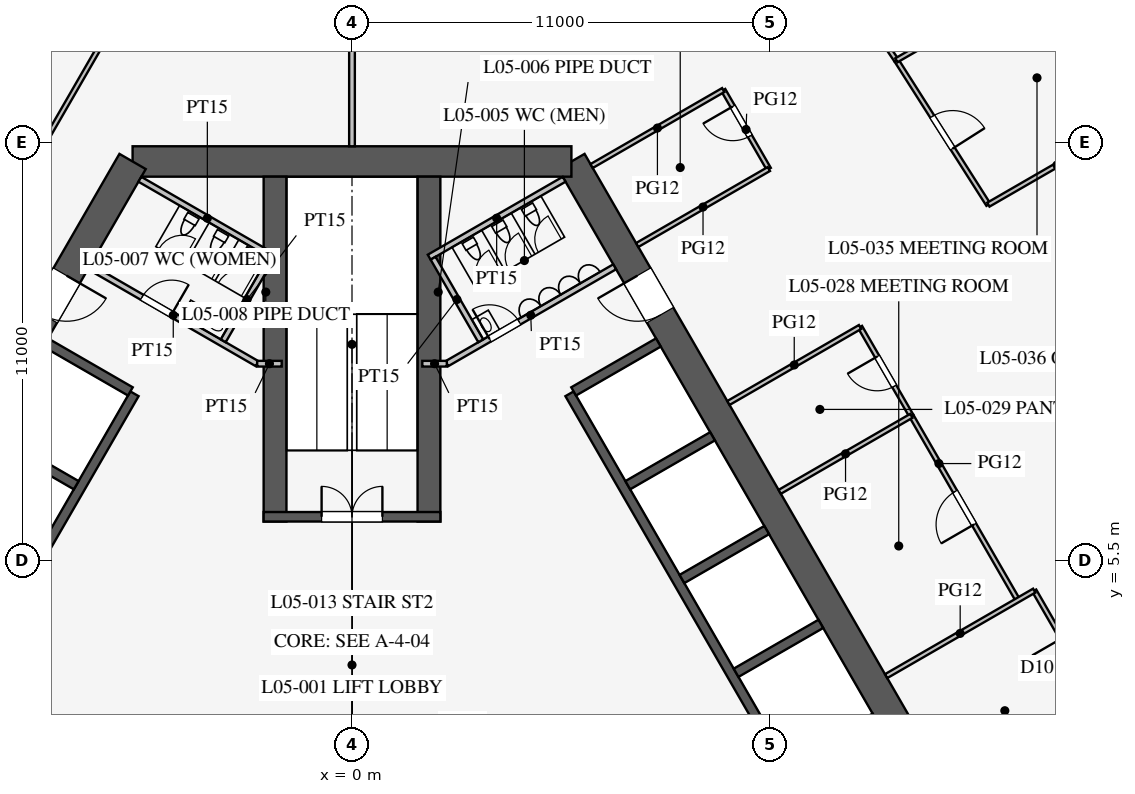
"""IFC4 building model, lengths in metres.
Left out: names, types, materials, properties, quantities, classifications, styles, units other than length and angle.
Written with IfcOpenShell. Run it as: python <this file> out.ifc"""

import sys

from ifc_helpers import new_model, si_unit, direction, frame, frame_2d, origin, place, context, subcontext, project, spatial, rectangle, extrude, element, fill, save


model = new_model("IFC4")
c1 = context("Model", 3, precision=1e-05, world=origin(), true_north=direction((0.0, 1.0)))
c2 = subcontext(c1, "Body", "Model", "MODEL_VIEW")
j1 = project(units=[si_unit("LENGTHUNIT", "METRE"), si_unit("PLANEANGLEUNIT", "RADIAN")], contexts=[c1])
p1 = place(None, origin())
s1 = spatial("IfcSite", under=j1, at=p1, CompositionType="ELEMENT")
p2 = place(p1, origin())
s2 = spatial("IfcBuilding", under=s1, at=p2, CompositionType="ELEMENT")
p3 = place(p2, frame((0.0, 0.0, 24.9)))
s3 = spatial("IfcBuildingStorey", under=s2, at=p3, CompositionType="ELEMENT", Elevation=24.9)
p4 = place(p3, frame((16.743, -3.0, 0.0), z_axis=(0.0, 0.0, 1.0), x_axis=(-0.500002442456, 0.866023993627, 0.0)))
e1 = element("IfcWall", 1, at=p4, inside=s3, PredefinedType="SHEAR", context=c2, shape_type="SweptSolid", body=[
    extrude(rectangle(XDim=21.939, YDim=0.8, at=frame_2d((10.97, 0.0))), origin(), (0.0, 0.0, 1.0), 4.2),
])
p5 = place(p4, frame((17.27, 0.0, 0.0)))
e2 = element("IfcOpeningElement", 2, at=p5, cuts=e1, PredefinedType="OPENING", context=c2, shape_type="SweptSolid", body=[
    extrude(rectangle(XDim=1.2, YDim=2.1, at=frame_2d((0.6, 1.05))), frame((0.0, 0.41, 0.0), z_axis=(0.0, -1.0, 0.0), x_axis=(1.0, 0.0, 0.0)), (0.0, 0.0, 1.0), 0.82),
])
p6 = place(p4, frame((3.47, 0.0, 0.0)))
e3 = element("IfcOpeningElement", 3, at=p6, cuts=e1, PredefinedType="OPENING", context=c2, shape_type="SweptSolid", body=[
    extrude(rectangle(XDim=1.2, YDim=2.1, at=frame_2d((0.6, 1.05))), frame((0.0, 0.41, 0.0), z_axis=(0.0, -1.0, 0.0), x_axis=(1.0, 0.0, 0.0)), (0.0, 0.0, 1.0), 0.82),
])
p7 = place(p3, frame((5.773, 16.0, 0.0), z_axis=(0.0, 0.0, 1.0), x_axis=(-1.0, 0.0, 0.0)))
e4 = element("IfcWall", 4, at=p7, inside=s3, PredefinedType="SHEAR", context=c2, shape_type="SweptSolid", body=[
    extrude(rectangle(XDim=11.547, YDim=0.8, at=frame_2d((5.773, 0.0))), origin(), (0.0, 0.0, 1.0), 4.2),
])
p8 = place(p3, frame((-5.773, 16.0, 0.0), z_axis=(0.0, 0.0, 1.0), x_axis=(-0.500002442456, -0.866023993627, 0.0)))
e5 = element("IfcWall", 5, at=p8, inside=s3, PredefinedType="SHEAR", context=c2, shape_type="SweptSolid", body=[
    extrude(rectangle(XDim=21.939, YDim=0.8, at=frame_2d((10.97, 0.0))), origin(), (0.0, 0.0, 1.0), 4.2),
])
p9 = place(p8, frame((17.27, 0.0, 0.0)))
e6 = element("IfcOpeningElement", 6, at=p9, cuts=e5, PredefinedType="OPENING", context=c2, shape_type="SweptSolid", body=[
    extrude(rectangle(XDim=1.2, YDim=2.1, at=frame_2d((0.6, 1.05))), frame((0.0, 0.41, 0.0), z_axis=(0.0, -1.0, 0.0), x_axis=(1.0, 0.0, 0.0)), (0.0, 0.0, 1.0), 0.82),
])
p10 = place(p8, frame((3.47, 0.0, 0.0)))
e7 = element("IfcOpeningElement", 7, at=p10, cuts=e5, PredefinedType="OPENING", context=c2, shape_type="SweptSolid", body=[
    extrude(rectangle(XDim=1.2, YDim=2.1, at=frame_2d((0.6, 1.05))), frame((0.0, 0.41, 0.0), z_axis=(0.0, -1.0, 0.0), x_axis=(1.0, 0.0, 0.0)), (0.0, 0.0, 1.0), 0.82),
])
p11 = place(p3, frame((11.424, 0.014, 0.0), z_axis=(0.0, 0.0, 1.0), x_axis=(-0.500001763848, 0.866024385424, 0.0)))
e8 = element("IfcWall", 8, at=p11, inside=s3, PredefinedType="SHEAR", context=c2, shape_type="SweptSolid", body=[
    extrude(rectangle(XDim=11.4, YDim=0.25, at=frame_2d((5.7, 0.0))), origin(), (0.0, 0.0, 1.0), 4.2),
])
for number, where, z_axis, x_axis in (
    (9, (11.532, 0.076, 0.0), (0.0, 0.0, 1.0), (0.866, 0.5, 0.0)),
    (10, (10.107, 2.544, 0.0), (0.0, 0.0, 1.0), (0.866, 0.5, 0.0)),
    (11, (8.682, 5.012, 0.0), (0.0, 0.0, 1.0), (0.866, 0.5, 0.0)),
    (12, (7.257, 7.481, 0.0), (0.0, 0.0, 1.0), (0.866, 0.5, 0.0)),
):
    element("IfcWall", number, at=place(p3, frame(where, z_axis=z_axis, x_axis=x_axis)), inside=s3, PredefinedType="SHEAR", context=c2, shape_type="SweptSolid", body=[
        extrude(rectangle(XDim=2.575, YDim=0.25, at=frame_2d((1.288, 0.0))), origin(), (0.0, 0.0, 1.0), 4.2),
    ])
p12 = place(p3, frame((5.832, 9.949, 0.0), z_axis=(0.0, 0.0, 1.0), x_axis=(0.866029291668, 0.499993265928, 0.0)))
e13 = element("IfcWall", 13, at=p12, inside=s3, PredefinedType="SHEAR", context=c2, shape_type="SweptSolid", body=[
    extrude(rectangle(XDim=2.575, YDim=0.25, at=frame_2d((1.288, 0.0))), origin(), (0.0, 0.0, 1.0), 4.2),
])
p13 = place(p3, frame((-5.724, 9.886, 0.0), z_axis=(0.0, 0.0, 1.0), x_axis=(-0.500001763848, -0.866024385424, 0.0)))
e14 = element("IfcWall", 14, at=p13, inside=s3, PredefinedType="SHEAR", context=c2, shape_type="SweptSolid", body=[
    extrude(rectangle(XDim=11.4, YDim=0.25, at=frame_2d((5.7, 0.0))), origin(), (0.0, 0.0, 1.0), 4.2),
])
p14 = place(p13, frame((6.525, 0.0, 0.0)))
e15 = element("IfcOpeningElement", 15, at=p14, cuts=e14, PredefinedType="OPENING", context=c2, shape_type="SweptSolid", body=[
    extrude(rectangle(XDim=1.2, YDim=2.2, at=frame_2d((0.6, 1.1))), frame((0.0, 0.135, 0.0), z_axis=(0.0, -1.0, 0.0), x_axis=(1.0, 0.0, 0.0)), (0.0, 0.0, 1.0), 0.27),
])
p15 = place(p13, frame((9.375, 0.0, 0.0)))
e16 = element("IfcOpeningElement", 16, at=p15, cuts=e14, PredefinedType="OPENING", context=c2, shape_type="SweptSolid", body=[
    extrude(rectangle(XDim=1.2, YDim=2.2, at=frame_2d((0.6, 1.1))), frame((0.0, 0.135, 0.0), z_axis=(0.0, -1.0, 0.0), x_axis=(1.0, 0.0, 0.0)), (0.0, 0.0, 1.0), 0.27),
])
p16 = place(p3, frame((-5.832, 9.949, 0.0), z_axis=(0.0, 0.0, 1.0), x_axis=(-0.866029291668, 0.499993265928, 0.0)))
e17 = element("IfcWall", 17, at=p16, inside=s3, PredefinedType="SHEAR", context=c2, shape_type="SweptSolid", body=[
    extrude(rectangle(XDim=2.575, YDim=0.25, at=frame_2d((1.288, 0.0))), origin(), (0.0, 0.0, 1.0), 4.2),
])
p17 = place(p3, frame((-7.257, 7.481, 0.0), z_axis=(0.0, 0.0, 1.0), x_axis=(-0.866046643894, 0.499963209246, 0.0)))
e18 = element("IfcWall", 18, at=p17, inside=s3, PredefinedType="SHEAR", context=c2, shape_type="SweptSolid", body=[
    extrude(rectangle(XDim=2.575, YDim=0.25, at=frame_2d((1.288, 0.0))), origin(), (0.0, 0.0, 1.0), 4.2),
])
for number, where, z_axis, x_axis in (
    (19, (2.025, 6.525, 0.0), (0.0, 0.0, 1.0), (0.0, 1.0, 0.0)),
    (20, (-2.025, 6.525, 0.0), (0.0, 0.0, 1.0), (0.0, 1.0, 0.0)),
):
    element("IfcWall", number, at=place(p3, frame(where, z_axis=z_axis, x_axis=x_axis)), inside=s3, PredefinedType="SHEAR", context=c2, shape_type="SweptSolid", body=[
        extrude(rectangle(XDim=9.075, YDim=0.6, at=frame_2d((4.538, 0.0))), origin(), (0.0, 0.0, 1.0), 4.2),
    ])
p18 = place(p3, frame((2.325, 6.65, 0.0), z_axis=(0.0, 0.0, 1.0), x_axis=(-1.0, 0.0, 0.0)))
e21 = element("IfcWall", 21, at=p18, inside=s3, PredefinedType="SHEAR", context=c2, shape_type="SweptSolid", body=[
    extrude(rectangle(XDim=4.65, YDim=0.25, at=frame_2d((2.325, 0.0))), origin(), (0.0, 0.0, 1.0), 4.2),
])
p19 = place(p18, frame((1.525, 0.0, 0.0)))
e22 = element("IfcOpeningElement", 22, at=p19, cuts=e21, PredefinedType="OPENING", context=c2, shape_type="SweptSolid", body=[
    extrude(rectangle(XDim=1.6, YDim=2.1, at=frame_2d((0.8, 1.05))), frame((0.0, 0.135, 0.0), z_axis=(0.0, -1.0, 0.0), x_axis=(1.0, 0.0, 0.0)), (0.0, 0.0, 1.0), 0.27),
])
p20 = place(p3, frame((2.495, 10.678, 0.0), z_axis=(0.0, 0.0, 1.0), x_axis=(0.86602216432, 0.500005610874, 0.0)))
e23 = element("IfcWall", 23, at=p20, inside=s3, PredefinedType="PARTITIONING", context=c2, shape_type="SweptSolid", body=[
    extrude(rectangle(XDim=5.1, YDim=0.15, at=frame_2d((2.55, 0.0))), origin(), (0.0, 0.0, 1.0), 4.0),
])
p21 = place(p20, frame((1.3, 0.0, 0.0)))
e24 = element("IfcOpeningElement", 24, at=p21, cuts=e23, PredefinedType="OPENING", context=c2, shape_type="SweptSolid", body=[
    extrude(rectangle(XDim=0.9, YDim=2.1, at=frame_2d((0.45, 1.05))), frame((0.0, 0.085, 0.0), z_axis=(0.0, -1.0, 0.0), x_axis=(1.0, 0.0, 0.0)), (0.0, 0.0, 1.0), 0.17),
])
p22 = place(p3, frame((-2.495, 10.678, 0.0), z_axis=(0.0, 0.0, 1.0), x_axis=(-0.86602216432, 0.500005610874, 0.0)))
e25 = element("IfcWall", 25, at=p22, inside=s3, PredefinedType="PARTITIONING", context=c2, shape_type="SweptSolid", body=[
    extrude(rectangle(XDim=5.1, YDim=0.15, at=frame_2d((2.55, 0.0))), origin(), (0.0, 0.0, 1.0), 4.0),
])
p23 = place(p22, frame((2.6, 0.0, 0.0)))
e26 = element("IfcOpeningElement", 26, at=p23, cuts=e25, PredefinedType="OPENING", context=c2, shape_type="SweptSolid", body=[
    extrude(rectangle(XDim=0.9, YDim=2.1, at=frame_2d((0.45, 1.05))), frame((0.0, 0.085, 0.0), z_axis=(0.0, -1.0, 0.0), x_axis=(1.0, 0.0, 0.0)), (0.0, 0.0, 1.0), 0.17),
])
for number, where, z_axis, x_axis in (
    (27, (2.495, 10.678, 0.0), (0.0, 0.0, 1.0), (-1.0, 0.0, 0.0)),
    (28, (-2.495, 10.678, 0.0), (0.0, 0.0, 1.0), (1.0, 0.0, 0.0)),
):
    element("IfcWall", number, at=place(p3, frame(where, z_axis=z_axis, x_axis=x_axis)), inside=s3, PredefinedType="PARTITIONING", context=c2, shape_type="SweptSolid", body=[
        extrude(rectangle(XDim=0.645, YDim=0.15, at=frame_2d((0.323, 0.0))), origin(), (0.0, 0.0, 1.0), 4.0),
    ])
p24 = place(p3, frame((2.031, 13.482, 0.0), z_axis=(0.0, 0.0, 1.0), x_axis=(0.866050731258, 0.499956128963, 0.0)))
e29 = element("IfcWall", 29, at=p24, inside=s3, PredefinedType="PARTITIONING", context=c2, shape_type="SweptSolid", body=[
    extrude(rectangle(XDim=4.1, YDim=0.15, at=frame_2d((2.05, 0.0))), origin(), (0.0, 0.0, 1.0), 4.0),
])
p25 = place(p3, frame((3.389, 11.281, 0.0), z_axis=(0.0, 0.0, 1.0), x_axis=(-0.499989096993, 0.866031698547, 0.0)))
e30 = element("IfcWall", 30, at=p25, inside=s3, PredefinedType="PARTITIONING", context=c2, shape_type="SweptSolid", body=[
    extrude(rectangle(XDim=2.51, YDim=0.15, at=frame_2d((1.255, 0.0))), origin(), (0.0, 0.0, 1.0), 4.0),
])
p26 = place(p3, frame((-2.031, 13.482, 0.0), z_axis=(0.0, 0.0, 1.0), x_axis=(-0.866050731258, 0.499956128963, 0.0)))
e31 = element("IfcWall", 31, at=p26, inside=s3, PredefinedType="PARTITIONING", context=c2, shape_type="SweptSolid", body=[
    extrude(rectangle(XDim=4.1, YDim=0.15, at=frame_2d((2.05, 0.0))), origin(), (0.0, 0.0, 1.0), 4.0),
])
p27 = place(p3, frame((-3.389, 11.281, 0.0), z_axis=(0.0, 0.0, 1.0), x_axis=(0.499989096993, 0.866031698547, 0.0)))
e32 = element("IfcWall", 32, at=p27, inside=s3, PredefinedType="PARTITIONING", context=c2, shape_type="SweptSolid", body=[
    extrude(rectangle(XDim=2.51, YDim=0.15, at=frame_2d((1.255, 0.0))), origin(), (0.0, 0.0, 1.0), 4.0),
])
p28 = place(p3, frame((0.0, 16.4, 0.0), z_axis=(0.0, 0.0, 1.0), x_axis=(0.0, 1.0, 0.0)))
e33 = element("IfcWall", 33, at=p28, inside=s3, PredefinedType="PARTITIONING", context=c2, shape_type="SweptSolid", body=[
    extrude(rectangle(XDim=18.25, YDim=0.15, at=frame_2d((9.125, 0.0))), origin(), (0.0, 0.0, 1.0), 2.3),
])
p29 = place(p3, frame((14.719, 9.306, 0.0), z_axis=(0.0, 0.0, 1.0), x_axis=(-0.4999416173, 0.866059108428, 0.0)))
e34 = element("IfcWall", 34, at=p29, inside=s3, PredefinedType="PARTITIONING", context=c2, shape_type="SweptSolid", body=[
    extrude(rectangle(XDim=2.7, YDim=0.12, at=frame_2d((1.35, 0.0))), origin(), (0.0, 0.0, 1.0), 2.9),
])
p30 = place(p29, frame((0.9, 0.0, 0.15)))
e35 = element("IfcOpeningElement", 35, at=p30, cuts=e34, PredefinedType="OPENING", context=c2, shape_type="SweptSolid", body=[
    extrude(rectangle(XDim=0.9, YDim=2.1, at=frame_2d((0.45, 1.05))), frame((0.0, 0.07, 0.0), z_axis=(0.0, -1.0, 0.0), x_axis=(1.0, 0.0, 0.0)), (0.0, 0.0, 1.0), 0.14),
])
p31 = place(p3, frame((10.969, 15.802, 0.0), z_axis=(0.0, 0.0, 1.0), x_axis=(-0.500001309137, 0.866024647952, 0.0)))
e36 = element("IfcWall", 36, at=p31, inside=s3, PredefinedType="PARTITIONING", context=c2, shape_type="SweptSolid", body=[
    extrude(rectangle(XDim=2.4, YDim=0.12, at=frame_2d((1.2, 0.0))), origin(), (0.0, 0.0, 1.0), 2.9),
])
p32 = place(p31, frame((1.0, 0.0, 0.15)))
e37 = element("IfcOpeningElement", 37, at=p32, cuts=e36, PredefinedType="OPENING", context=c2, shape_type="SweptSolid", body=[
    extrude(rectangle(XDim=0.9, YDim=2.1, at=frame_2d((0.45, 1.05))), frame((0.0, 0.07, 0.0), z_axis=(0.0, -1.0, 0.0), x_axis=(1.0, 0.0, 0.0)), (0.0, 0.0, 1.0), 0.14),
])
p33 = place(p3, frame((17.519, 4.457, 0.0), z_axis=(0.0, 0.0, 1.0), x_axis=(-0.500016814911, 0.866015695474, 0.0)))
e38 = element("IfcWall", 38, at=p33, inside=s3, PredefinedType="PARTITIONING", context=c2, shape_type="SweptSolid", body=[
    extrude(rectangle(XDim=5.6, YDim=0.12, at=frame_2d((2.8, 0.0))), origin(), (0.0, 0.0, 1.0), 2.9),
])
p34 = place(p33, frame((2.3, 0.0, 0.15)))
e39 = element("IfcOpeningElement", 39, at=p34, cuts=e38, PredefinedType="OPENING", context=c2, shape_type="SweptSolid", body=[
    extrude(rectangle(XDim=1.0, YDim=2.1, at=frame_2d((0.5, 1.05))), frame((0.0, 0.07, 0.0), z_axis=(0.0, -1.0, 0.0), x_axis=(1.0, 0.0, 0.0)), (0.0, 0.0, 1.0), 0.14),
])
p35 = place(p3, frame((20.302, 0.636, 0.0), z_axis=(0.0, 0.0, 1.0), x_axis=(-0.499977259774, 0.866038532462, 0.0)))
e40 = element("IfcWall", 40, at=p35, inside=s3, PredefinedType="PARTITIONING", context=c2, shape_type="SweptSolid", body=[
    extrude(rectangle(XDim=4.7, YDim=0.12, at=frame_2d((2.35, 0.0))), origin(), (0.0, 0.0, 1.0), 2.9),
])
p36 = place(p35, frame((1.45, 0.0, 0.15)))
e41 = element("IfcOpeningElement", 41, at=p36, cuts=e40, PredefinedType="OPENING", context=c2, shape_type="SweptSolid", body=[
    extrude(rectangle(XDim=1.8, YDim=2.1, at=frame_2d((0.9, 1.05))), frame((0.0, 0.07, 0.0), z_axis=(0.0, -1.0, 0.0), x_axis=(1.0, 0.0, 0.0)), (0.0, 0.0, 1.0), 0.14),
])
for number, where, z_axis, x_axis in (
    (42, (11.255, 7.306, 0.0), (0.0, 0.0, 1.0), (0.866, 0.5, 0.0)),
    (43, (6.305, 15.88, 0.0), (0.0, 0.0, 1.0), (0.866, 0.5, 0.0)),
    (44, (9.905, 9.645, 0.0), (0.0, 0.0, 1.0), (0.866, 0.5, 0.0)),
    (45, (7.505, 13.802, 0.0), (0.0, 0.0, 1.0), (0.866, 0.5, 0.0)),
):
    element("IfcWall", number, at=place(p3, frame(where, z_axis=z_axis, x_axis=x_axis)), inside=s3, PredefinedType="PARTITIONING", context=c2, shape_type="SweptSolid", body=[
        extrude(rectangle(XDim=4.0, YDim=0.12, at=frame_2d((2.0, 0.0))), origin(), (0.0, 0.0, 1.0), 2.9),
    ])
p37 = place(p3, frame((14.055, 2.457, 0.0), z_axis=(0.0, 0.0, 1.0), x_axis=(0.866031096941, 0.499990139034, 0.0)))
e46 = element("IfcWall", 46, at=p37, inside=s3, PredefinedType="PARTITIONING", context=c2, shape_type="SweptSolid", body=[
    extrude(rectangle(XDim=4.5, YDim=0.12, at=frame_2d((2.25, 0.0))), origin(), (0.0, 0.0, 1.0), 2.9),
])
p38 = place(p3, frame((16.745, 14.864, 0.0), z_axis=(0.0, 0.0, 1.0), x_axis=(-0.537205132487, 0.843451626135, 0.0)))
e47 = element("IfcWall", 47, at=p38, inside=s3, PredefinedType="PARTITIONING", context=c2, shape_type="SweptSolid", body=[
    extrude(rectangle(XDim=4.504, YDim=0.12, at=frame_2d((2.252, 0.0))), origin(), (0.0, 0.0, 1.0), 2.9),
])
p39 = place(p38, frame((1.75, 0.0, 0.15)))
e48 = element("IfcOpeningElement", 48, at=p39, cuts=e47, PredefinedType="OPENING", context=c2, shape_type="SweptSolid", body=[
    extrude(rectangle(XDim=1.0, YDim=2.1, at=frame_2d((0.5, 1.05))), frame((0.0, 0.07, 0.0), z_axis=(0.0, -1.0, 0.0), x_axis=(1.0, 0.0, 0.0)), (0.0, 0.0, 1.0), 0.14),
])
p40 = place(p3, frame((14.325, 18.663, 0.0), z_axis=(0.0, 0.0, 1.0), x_axis=(-0.561512004239, 0.827468591002, 0.0)))
e49 = element("IfcWall", 49, at=p40, inside=s3, PredefinedType="PARTITIONING", context=c2, shape_type="SweptSolid", body=[
    extrude(rectangle(XDim=4.512, YDim=0.12, at=frame_2d((2.256, 0.0))), origin(), (0.0, 0.0, 1.0), 2.9),
])
p41 = place(p40, frame((1.8, 0.0, 0.15)))
e50 = element("IfcOpeningElement", 50, at=p41, cuts=e49, PredefinedType="OPENING", context=c2, shape_type="SweptSolid", body=[
    extrude(rectangle(XDim=0.9, YDim=2.1, at=frame_2d((0.45, 1.05))), frame((0.0, 0.07, 0.0), z_axis=(0.0, -1.0, 0.0), x_axis=(1.0, 0.0, 0.0)), (0.0, 0.0, 1.0), 0.14),
])
p42 = place(p3, frame((16.745, 14.864, 0.0), z_axis=(0.0, 0.0, 1.0), x_axis=(0.866025669538, 0.499999539701, 0.0)))
e51 = element("IfcWall", 51, at=p42, inside=s3, PredefinedType="PARTITIONING", context=c2, shape_type="SweptSolid", body=[
    extrude(rectangle(XDim=4.169, YDim=0.12, at=frame_2d((2.085, 0.0))), origin(), (0.0, 0.0, 1.0), 2.9),
])
p43 = place(p3, frame((14.325, 18.663, 0.0), z_axis=(0.0, 0.0, 1.0), x_axis=(0.866009971343, 0.50002672882, 0.0)))
e52 = element("IfcWall", 52, at=p43, inside=s3, PredefinedType="PARTITIONING", context=c2, shape_type="SweptSolid", body=[
    extrude(rectangle(XDim=4.167, YDim=0.12, at=frame_2d((2.083, 0.0))), origin(), (0.0, 0.0, 1.0), 2.9),
])
p44 = place(p3, frame((-0.016, 30.491, 0.0), z_axis=(0.0, 0.0, 1.0), x_axis=(-0.50000091641, -0.866024874695, 0.0)))
e53 = element("IfcWall", 53, at=p44, inside=s3, PredefinedType="PARTITIONING", context=c2, shape_type="SweptSolid", body=[
    extrude(rectangle(XDim=52.796, YDim=0.12, at=frame_2d((26.398, 0.0))), origin(), (0.0, 0.0, 1.0), 2.9),
])
p45 = place(p44, frame((10.2, 0.0, 0.15)))
e54 = element("IfcOpeningElement", 54, at=p45, cuts=e53, PredefinedType="OPENING", context=c2, shape_type="SweptSolid", body=[
    extrude(rectangle(XDim=1.8, YDim=2.1, at=frame_2d((0.9, 1.05))), frame((0.0, 0.07, 0.0), z_axis=(0.0, -1.0, 0.0), x_axis=(1.0, 0.0, 0.0)), (0.0, 0.0, 1.0), 0.14),
])
p46 = place(p44, frame((40.8, 0.0, 0.15)))
e55 = element("IfcOpeningElement", 55, at=p46, cuts=e53, PredefinedType="OPENING", context=c2, shape_type="SweptSolid", body=[
    extrude(rectangle(XDim=1.8, YDim=2.1, at=frame_2d((0.9, 1.05))), frame((0.0, 0.07, 0.0), z_axis=(0.0, -1.0, 0.0), x_axis=(1.0, 0.0, 0.0)), (0.0, 0.0, 1.0), 0.14),
])
p47 = place(p21, origin())
e56 = element("IfcDoor", 56, at=p47, inside=s3, OperationType="SINGLE_SWING_LEFT", PredefinedType="DOOR", context=c2, shape_type="SweptSolid", body=[
    extrude(rectangle(XDim=0.9, YDim=2.1, at=frame_2d((0.45, 1.05))), frame((0.0, 0.025, 0.0), z_axis=(0.0, -1.0, 0.0), x_axis=(1.0, 0.0, 0.0)), (0.0, 0.0, 1.0), 0.05),
])
fill(e24, e56)
p48 = place(p23, frame((0.9, 0.0, 0.0), z_axis=(0.0, 0.0, 1.0), x_axis=(-1.0, 0.0, 0.0)))
e57 = element("IfcDoor", 57, at=p48, inside=s3, OperationType="SINGLE_SWING_RIGHT", PredefinedType="DOOR", context=c2, shape_type="SweptSolid", body=[
    extrude(rectangle(XDim=0.9, YDim=2.1, at=frame_2d((0.45, 1.05))), frame((0.0, 0.025, 0.0), z_axis=(0.0, -1.0, 0.0), x_axis=(1.0, 0.0, 0.0)), (0.0, 0.0, 1.0), 0.05),
])
fill(e26, e57)
p49 = place(p19, frame((1.6, 0.0, 0.0), z_axis=(0.0, 0.0, 1.0), x_axis=(-1.0, 0.0, 0.0)))
e58 = element("IfcDoor", 58, at=p49, inside=s3, OperationType="DOUBLE_DOOR_SINGLE_SWING", PredefinedType="DOOR", context=c2, shape_type="SweptSolid", body=[
    extrude(rectangle(XDim=1.6, YDim=2.1, at=frame_2d((0.8, 1.05))), frame((0.0, 0.025, 0.0), z_axis=(0.0, -1.0, 0.0), x_axis=(1.0, 0.0, 0.0)), (0.0, 0.0, 1.0), 0.05),
])
fill(e22, e58)
p50 = place(p5, origin())
e59 = element("IfcDoor", 59, at=p50, inside=s3, OperationType="SINGLE_SWING_RIGHT", PredefinedType="DOOR", context=c2, shape_type="SweptSolid", body=[
    extrude(rectangle(XDim=1.2, YDim=2.1, at=frame_2d((0.6, 1.05))), frame((0.0, 0.025, 0.0), z_axis=(0.0, -1.0, 0.0), x_axis=(1.0, 0.0, 0.0)), (0.0, 0.0, 1.0), 0.05),
])
fill(e2, e59)
p51 = place(p10, origin())
e60 = element("IfcDoor", 60, at=p51, inside=s3, OperationType="SINGLE_SWING_LEFT", PredefinedType="DOOR", context=c2, shape_type="SweptSolid", body=[
    extrude(rectangle(XDim=1.2, YDim=2.1, at=frame_2d((0.6, 1.05))), frame((0.0, 0.025, 0.0), z_axis=(0.0, -1.0, 0.0), x_axis=(1.0, 0.0, 0.0)), (0.0, 0.0, 1.0), 0.05),
])
fill(e7, e60)
p52 = place(p34, origin())
e61 = element("IfcDoor", 61, at=p52, inside=s3, OperationType="SINGLE_SWING_LEFT", PredefinedType="DOOR", context=c2, shape_type="SweptSolid", body=[
    extrude(rectangle(XDim=1.0, YDim=2.1, at=frame_2d((0.5, 1.05))), frame((0.0, 0.025, 0.0), z_axis=(0.0, -1.0, 0.0), x_axis=(1.0, 0.0, 0.0)), (0.0, 0.0, 1.0), 0.05),
])
fill(e39, e61)
p53 = place(p30, origin())
e62 = element("IfcDoor", 62, at=p53, inside=s3, OperationType="SINGLE_SWING_RIGHT", PredefinedType="DOOR", context=c2, shape_type="SweptSolid", body=[
    extrude(rectangle(XDim=0.9, YDim=2.1, at=frame_2d((0.45, 1.05))), frame((0.0, 0.025, 0.0), z_axis=(0.0, -1.0, 0.0), x_axis=(1.0, 0.0, 0.0)), (0.0, 0.0, 1.0), 0.05),
])
fill(e35, e62)
p54 = place(p32, origin())
e63 = element("IfcDoor", 63, at=p54, inside=s3, OperationType="SINGLE_SWING_RIGHT", PredefinedType="DOOR", context=c2, shape_type="SweptSolid", body=[
    extrude(rectangle(XDim=0.9, YDim=2.1, at=frame_2d((0.45, 1.05))), frame((0.0, 0.025, 0.0), z_axis=(0.0, -1.0, 0.0), x_axis=(1.0, 0.0, 0.0)), (0.0, 0.0, 1.0), 0.05),
])
fill(e37, e63)
p55 = place(p39, frame((1.0, 0.0, 0.0), z_axis=(0.0, 0.0, 1.0), x_axis=(-1.0, 0.0, 0.0)))
e64 = element("IfcDoor", 64, at=p55, inside=s3, OperationType="SINGLE_SWING_RIGHT", PredefinedType="DOOR", context=c2, shape_type="SweptSolid", body=[
    extrude(rectangle(XDim=1.0, YDim=2.1, at=frame_2d((0.5, 1.05))), frame((0.0, 0.025, 0.0), z_axis=(0.0, -1.0, 0.0), x_axis=(1.0, 0.0, 0.0)), (0.0, 0.0, 1.0), 0.05),
])
fill(e48, e64)
save(model, sys.argv[1])
